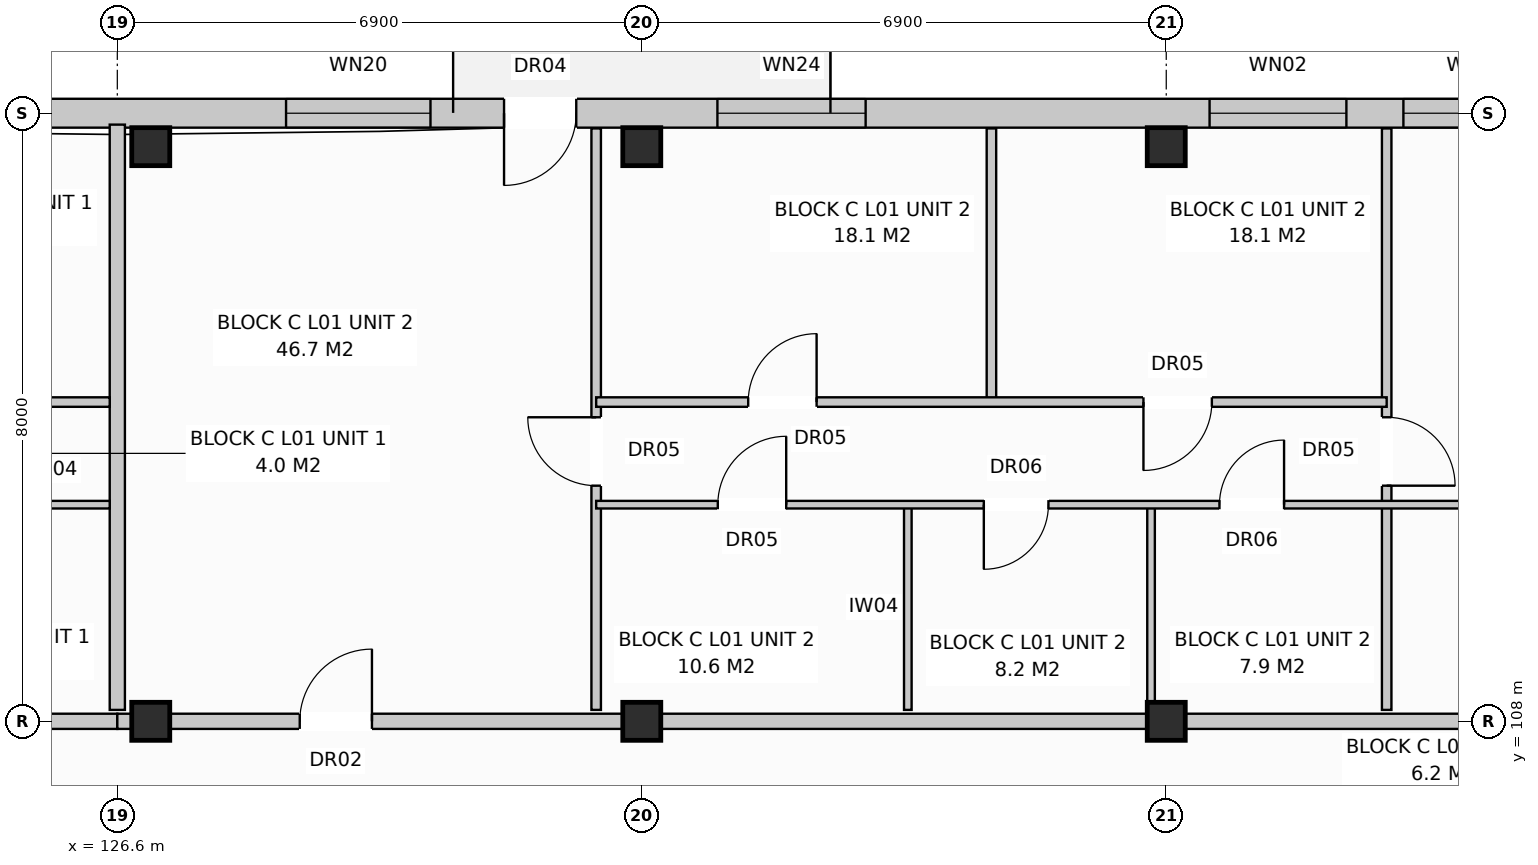
"""IFC4 building model, lengths in metres.
Left out: names, types, materials, properties, quantities, classifications, styles, units other than length and angle.
Written with IfcOpenShell. Run it as: python <this file> out.ifc"""

import sys

from ifc_helpers import new_model, si_unit, direction, frame, frame_2d, origin, origin_with_axes, origin_2d, place, context, subcontext, project, spatial, rectangle, extrude, element, fill, save


model = new_model("IFC4")
c1 = context("Model", 3, precision=1e-05, world=origin(), true_north=direction((0.0, 1.0)))
c2 = subcontext(c1, "Body", "Model", "MODEL_VIEW")
j1 = project(units=[si_unit("LENGTHUNIT", "METRE"), si_unit("PLANEANGLEUNIT", "RADIAN")], contexts=[c1])
p1 = place(None, origin())
s1 = spatial("IfcSite", under=j1, at=p1, CompositionType="ELEMENT")
p2 = place(p1, origin())
s2 = spatial("IfcBuilding", under=s1, at=p2, CompositionType="ELEMENT")
p3 = place(p2, frame((0.0, 0.0, 4.4)))
s3 = spatial("IfcBuildingStorey", under=s2, at=p3, CompositionType="ELEMENT", Elevation=4.4)
for number, where, z_axis, x_axis in (
    (1, (127.04, 108.0, 0.0), (0.0, 0.0, 1.0), (1.0, 0.0, 0.0)),
    (2, (127.04, 115.56, 0.0), (0.0, 0.0, 1.0), (1.0, 0.0, 0.0)),
    (3, (133.5, 108.0, 0.0), (0.0, 0.0, 1.0), (1.0, 0.0, 0.0)),
    (4, (133.5, 115.56, 0.0), (0.0, 0.0, 1.0), (1.0, 0.0, 0.0)),
    (5, (140.4, 108.0, 0.0), (0.0, 0.0, 1.0), (1.0, 0.0, 0.0)),
    (6, (140.4, 115.56, 0.0), (0.0, 0.0, 1.0), (1.0, 0.0, 0.0)),
):
    element("IfcColumn", number, at=place(p3, frame(where, z_axis=z_axis, x_axis=x_axis)), inside=s3, PredefinedType="COLUMN", context=c2, shape_type="SweptSolid", body=[
        extrude(rectangle(XDim=0.5, YDim=0.5, at=origin_2d()), origin(), (0.0, 0.0, 1.0), 3.6),
    ])
p4 = place(p3, frame((112.98, 116.0, 0.0), z_axis=(0.0, 0.0, 1.0), x_axis=(1.0, 0.0, 0.0)))
e7 = element("IfcWall", 7, at=p4, inside=s3, PredefinedType="STANDARD", context=c2, shape_type="SweptSolid", body=[
    extrude(rectangle(XDim=54.84, YDim=0.38, at=frame_2d((27.42, 0.0))), origin(), (0.0, 0.0, 1.0), 3.33),
])
p5 = place(p4, frame((7.39, 0.0, 0.0)))
e8 = element("IfcOpeningElement", 8, at=p5, cuts=e7, PredefinedType="OPENING", context=c2, shape_type="SweptSolid", body=[
    extrude(rectangle(XDim=0.95, YDim=2.1, at=frame_2d((0.475, 1.05))), frame((0.0, 0.202, 0.0), z_axis=(0.0, -1.0, 0.0), x_axis=(1.0, 0.0, 0.0)), (0.0, 0.0, 1.0), 0.404),
])
p6 = place(p4, frame((18.708, 0.0, 0.0)))
e9 = element("IfcOpeningElement", 9, at=p6, cuts=e7, PredefinedType="OPENING", context=c2, shape_type="SweptSolid", body=[
    extrude(rectangle(XDim=0.95, YDim=2.1, at=frame_2d((0.475, 1.05))), frame((0.0, 0.202, 0.0), z_axis=(0.0, -1.0, 0.0), x_axis=(1.0, 0.0, 0.0)), (0.0, 0.0, 1.0), 0.404),
])
p7 = place(p4, frame((32.708, 0.0, 0.0)))
e10 = element("IfcOpeningElement", 10, at=p7, cuts=e7, PredefinedType="OPENING", context=c2, shape_type="SweptSolid", body=[
    extrude(rectangle(XDim=0.95, YDim=2.1, at=frame_2d((0.475, 1.05))), frame((0.0, 0.202, 0.0), z_axis=(0.0, -1.0, 0.0), x_axis=(1.0, 0.0, 0.0)), (0.0, 0.0, 1.0), 0.404),
])
p8 = place(p4, frame((46.508, 0.0, 0.0)))
e11 = element("IfcOpeningElement", 11, at=p8, cuts=e7, PredefinedType="OPENING", context=c2, shape_type="SweptSolid", body=[
    extrude(rectangle(XDim=0.95, YDim=2.1, at=frame_2d((0.475, 1.05))), frame((0.0, 0.202, 0.0), z_axis=(0.0, -1.0, 0.0), x_axis=(1.0, 0.0, 0.0)), (0.0, 0.0, 1.0), 0.404),
])
p9 = place(p4, frame((1.515, 0.0, 0.8)))
e12 = element("IfcOpeningElement", 12, at=p9, cuts=e7, PredefinedType="OPENING", context=c2, shape_type="SweptSolid", body=[
    extrude(rectangle(XDim=1.95, YDim=1.65, at=frame_2d((0.975, 0.825))), frame((0.0, 0.202, 0.0), z_axis=(0.0, -1.0, 0.0), x_axis=(1.0, 0.0, 0.0)), (0.0, 0.0, 1.0), 0.404),
])
p10 = place(p4, frame((10.49, 0.0, 0.8)))
e13 = element("IfcOpeningElement", 13, at=p10, cuts=e7, PredefinedType="OPENING", context=c2, shape_type="SweptSolid", body=[
    extrude(rectangle(XDim=1.8, YDim=1.7, at=frame_2d((0.9, 0.85))), frame((0.0, 0.202, 0.0), z_axis=(0.0, -1.0, 0.0), x_axis=(1.0, 0.0, 0.0)), (0.0, 0.0, 1.0), 0.404),
])
p11 = place(p4, frame((15.84, 0.0, 0.8)))
e14 = element("IfcOpeningElement", 14, at=p11, cuts=e7, PredefinedType="OPENING", context=c2, shape_type="SweptSolid", body=[
    extrude(rectangle(XDim=1.9, YDim=1.85, at=frame_2d((0.95, 0.925))), frame((0.0, 0.202, 0.0), z_axis=(0.0, -1.0, 0.0), x_axis=(1.0, 0.0, 0.0)), (0.0, 0.0, 1.0), 0.404),
])
p12 = place(p4, frame((21.515, 0.0, 0.8)))
e15 = element("IfcOpeningElement", 15, at=p12, cuts=e7, PredefinedType="OPENING", context=c2, shape_type="SweptSolid", body=[
    extrude(rectangle(XDim=1.95, YDim=1.65, at=frame_2d((0.975, 0.825))), frame((0.0, 0.202, 0.0), z_axis=(0.0, -1.0, 0.0), x_axis=(1.0, 0.0, 0.0)), (0.0, 0.0, 1.0), 0.404),
])
p13 = place(p4, frame((27.99, 0.0, 0.8)))
e16 = element("IfcOpeningElement", 16, at=p13, cuts=e7, PredefinedType="OPENING", context=c2, shape_type="SweptSolid", body=[
    extrude(rectangle(XDim=1.8, YDim=1.7, at=frame_2d((0.9, 0.85))), frame((0.0, 0.202, 0.0), z_axis=(0.0, -1.0, 0.0), x_axis=(1.0, 0.0, 0.0)), (0.0, 0.0, 1.0), 0.404),
])
p14 = place(p4, frame((30.54, 0.0, 0.8)))
e17 = element("IfcOpeningElement", 17, at=p14, cuts=e7, PredefinedType="OPENING", context=c2, shape_type="SweptSolid", body=[
    extrude(rectangle(XDim=1.9, YDim=1.85, at=frame_2d((0.95, 0.925))), frame((0.0, 0.202, 0.0), z_axis=(0.0, -1.0, 0.0), x_axis=(1.0, 0.0, 0.0)), (0.0, 0.0, 1.0), 0.404),
])
p15 = place(p4, frame((35.515, 0.0, 0.8)))
e18 = element("IfcOpeningElement", 18, at=p15, cuts=e7, PredefinedType="OPENING", context=c2, shape_type="SweptSolid", body=[
    extrude(rectangle(XDim=1.95, YDim=1.65, at=frame_2d((0.975, 0.825))), frame((0.0, 0.202, 0.0), z_axis=(0.0, -1.0, 0.0), x_axis=(1.0, 0.0, 0.0)), (0.0, 0.0, 1.0), 0.404),
])
p16 = place(p4, frame((38.89, 0.0, 0.8)))
e19 = element("IfcOpeningElement", 19, at=p16, cuts=e7, PredefinedType="OPENING", context=c2, shape_type="SweptSolid", body=[
    extrude(rectangle(XDim=1.8, YDim=1.7, at=frame_2d((0.9, 0.85))), frame((0.0, 0.202, 0.0), z_axis=(0.0, -1.0, 0.0), x_axis=(1.0, 0.0, 0.0)), (0.0, 0.0, 1.0), 0.404),
])
p17 = place(p4, frame((44.34, 0.0, 0.8)))
e20 = element("IfcOpeningElement", 20, at=p17, cuts=e7, PredefinedType="OPENING", context=c2, shape_type="SweptSolid", body=[
    extrude(rectangle(XDim=1.9, YDim=1.85, at=frame_2d((0.95, 0.925))), frame((0.0, 0.202, 0.0), z_axis=(0.0, -1.0, 0.0), x_axis=(1.0, 0.0, 0.0)), (0.0, 0.0, 1.0), 0.404),
])
p18 = place(p4, frame((49.115, 0.0, 0.8)))
e21 = element("IfcOpeningElement", 21, at=p18, cuts=e7, PredefinedType="OPENING", context=c2, shape_type="SweptSolid", body=[
    extrude(rectangle(XDim=1.95, YDim=1.65, at=frame_2d((0.975, 0.825))), frame((0.0, 0.202, 0.0), z_axis=(0.0, -1.0, 0.0), x_axis=(1.0, 0.0, 0.0)), (0.0, 0.0, 1.0), 0.404),
])
p19 = place(p4, frame((52.405, 0.0, 0.8)))
e22 = element("IfcOpeningElement", 22, at=p19, cuts=e7, PredefinedType="OPENING", context=c2, shape_type="SweptSolid", body=[
    extrude(rectangle(XDim=1.8, YDim=1.7, at=frame_2d((0.9, 0.85))), frame((0.0, 0.202, 0.0), z_axis=(0.0, -1.0, 0.0), x_axis=(1.0, 0.0, 0.0)), (0.0, 0.0, 1.0), 0.404),
])
p20 = place(p3, frame((126.6, 108.15, 0.0), z_axis=(0.0, 0.0, 1.0), x_axis=(0.0, 1.0, 0.0)))
e23 = element("IfcWall", 23, at=p20, inside=s3, PredefinedType="PARTITIONING", context=c2, shape_type="SweptSolid", body=[
    extrude(rectangle(XDim=7.7, YDim=0.2, at=frame_2d((3.85, 0.0))), origin(), (0.0, 0.0, 1.0), 3.33),
])
p21 = place(p3, frame((112.8, 108.0, 0.0), z_axis=(0.0, 0.0, 1.0), x_axis=(1.0, 0.0, 0.0)))
e24 = element("IfcWall", 24, at=p21, inside=s3, PredefinedType="PARTITIONING", context=c2, shape_type="SweptSolid", body=[
    extrude(rectangle(XDim=13.8, YDim=0.2, at=frame_2d((6.9, 0.0))), origin(), (0.0, 0.0, 1.0), 2.77),
])
p22 = place(p21, frame((2.4, 0.0, 0.0)))
e25 = element("IfcOpeningElement", 25, at=p22, cuts=e24, PredefinedType="OPENING", context=c2, shape_type="SweptSolid", body=[
    extrude(rectangle(XDim=0.95, YDim=2.15, at=frame_2d((0.475, 1.075))), frame((0.0, 0.112, 0.0), z_axis=(0.0, -1.0, 0.0), x_axis=(1.0, 0.0, 0.0)), (0.0, 0.0, 1.0), 0.224),
])
p23 = place(p3, frame((118.0, 110.85, 0.0), z_axis=(0.0, 0.0, 1.0), x_axis=(1.0, 0.0, 0.0)))
e26 = element("IfcWall", 26, at=p23, inside=s3, PredefinedType="PARTITIONING", context=c2, shape_type="SweptSolid", body=[
    extrude(rectangle(XDim=8.5, YDim=0.1, at=frame_2d((4.25, 0.0))), origin(), (0.0, 0.0, 1.0), 3.33),
])
p24 = place(p23, frame((1.0, 0.0, 0.0)))
e27 = element("IfcOpeningElement", 27, at=p24, cuts=e26, PredefinedType="OPENING", context=c2, shape_type="SweptSolid", body=[
    extrude(rectangle(XDim=0.85, YDim=2.1, at=frame_2d((0.425, 1.05))), frame((0.0, 0.062, 0.0), z_axis=(0.0, -1.0, 0.0), x_axis=(1.0, 0.0, 0.0)), (0.0, 0.0, 1.0), 0.124),
])
p25 = place(p23, frame((3.4, 0.0, 0.0)))
e28 = element("IfcOpeningElement", 28, at=p25, cuts=e26, PredefinedType="OPENING", context=c2, shape_type="SweptSolid", body=[
    extrude(rectangle(XDim=0.85, YDim=2.05, at=frame_2d((0.425, 1.025))), frame((0.0, 0.062, 0.0), z_axis=(0.0, -1.0, 0.0), x_axis=(1.0, 0.0, 0.0)), (0.0, 0.0, 1.0), 0.124),
])
p26 = place(p23, frame((6.2, 0.0, 0.0)))
e29 = element("IfcOpeningElement", 29, at=p26, cuts=e26, PredefinedType="OPENING", context=c2, shape_type="SweptSolid", body=[
    extrude(rectangle(XDim=0.85, YDim=2.05, at=frame_2d((0.425, 1.025))), frame((0.0, 0.062, 0.0), z_axis=(0.0, -1.0, 0.0), x_axis=(1.0, 0.0, 0.0)), (0.0, 0.0, 1.0), 0.124),
])
p27 = place(p3, frame((118.0, 112.2, 0.0), z_axis=(0.0, 0.0, 1.0), x_axis=(1.0, 0.0, 0.0)))
e30 = element("IfcWall", 30, at=p27, inside=s3, PredefinedType="PARTITIONING", context=c2, shape_type="SweptSolid", body=[
    extrude(rectangle(XDim=8.5, YDim=0.125, at=frame_2d((4.25, 0.0))), origin(), (0.0, 0.0, 1.0), 3.33),
])
p28 = place(p27, frame((1.5, 0.0, 0.0)))
e31 = element("IfcOpeningElement", 31, at=p28, cuts=e30, PredefinedType="OPENING", context=c2, shape_type="SweptSolid", body=[
    extrude(rectangle(XDim=0.9, YDim=2.1, at=frame_2d((0.45, 1.05))), frame((0.0, 0.074, 0.0), z_axis=(0.0, -1.0, 0.0), x_axis=(1.0, 0.0, 0.0)), (0.0, 0.0, 1.0), 0.149),
])
p29 = place(p27, frame((5.6, 0.0, 0.0)))
e32 = element("IfcOpeningElement", 32, at=p29, cuts=e30, PredefinedType="OPENING", context=c2, shape_type="SweptSolid", body=[
    extrude(rectangle(XDim=0.9, YDim=2.1, at=frame_2d((0.45, 1.05))), frame((0.0, 0.074, 0.0), z_axis=(0.0, -1.0, 0.0), x_axis=(1.0, 0.0, 0.0)), (0.0, 0.0, 1.0), 0.149),
])
p30 = place(p3, frame((126.6, 108.0, 0.0), z_axis=(0.0, 0.0, 1.0), x_axis=(1.0, 0.0, 0.0)))
e33 = element("IfcWall", 33, at=p30, inside=s3, PredefinedType="PARTITIONING", context=c2, shape_type="SweptSolid", body=[
    extrude(rectangle(XDim=20.7, YDim=0.2, at=frame_2d((10.35, 0.0))), origin(), (0.0, 0.0, 1.0), 2.77),
])
p31 = place(p30, frame((2.4, 0.0, 0.0)))
e34 = element("IfcOpeningElement", 34, at=p31, cuts=e33, PredefinedType="OPENING", context=c2, shape_type="SweptSolid", body=[
    extrude(rectangle(XDim=0.95, YDim=2.15, at=frame_2d((0.475, 1.075))), frame((0.0, 0.112, 0.0), z_axis=(0.0, -1.0, 0.0), x_axis=(1.0, 0.0, 0.0)), (0.0, 0.0, 1.0), 0.224),
])
p32 = place(p3, frame((132.9, 108.15, 0.0), z_axis=(0.0, 0.0, 1.0), x_axis=(0.0, 1.0, 0.0)))
e35 = element("IfcWall", 35, at=p32, inside=s3, PredefinedType="PARTITIONING", context=c2, shape_type="SweptSolid", body=[
    extrude(rectangle(XDim=7.65, YDim=0.125, at=frame_2d((3.825, 0.0))), origin(), (0.0, 0.0, 1.0), 3.33),
])
p33 = place(p32, frame((2.95, 0.0, 0.0)))
e36 = element("IfcOpeningElement", 36, at=p33, cuts=e35, PredefinedType="OPENING", context=c2, shape_type="SweptSolid", body=[
    extrude(rectangle(XDim=0.9, YDim=2.1, at=frame_2d((0.45, 1.05))), frame((0.0, 0.074, 0.0), z_axis=(0.0, -1.0, 0.0), x_axis=(1.0, 0.0, 0.0)), (0.0, 0.0, 1.0), 0.149),
])
for number, where, z_axis, x_axis in (
    (37, (137.0, 108.15, 0.0), (0.0, 0.0, 1.0), (0.0, 1.0, 0.0)),
    (38, (140.2, 108.15, 0.0), (0.0, 0.0, 1.0), (0.0, 1.0, 0.0)),
):
    element("IfcWall", number, at=place(p3, frame(where, z_axis=z_axis, x_axis=x_axis)), inside=s3, PredefinedType="PARTITIONING", context=c2, shape_type="SweptSolid", body=[
        extrude(rectangle(XDim=2.7, YDim=0.1, at=frame_2d((1.35, 0.0))), origin(), (0.0, 0.0, 1.0), 3.33),
    ])
p34 = place(p3, frame((138.1, 112.2, 0.0), z_axis=(0.0, 0.0, 1.0), x_axis=(0.0, 1.0, 0.0)))
e39 = element("IfcWall", 39, at=p34, inside=s3, PredefinedType="PARTITIONING", context=c2, shape_type="SweptSolid", body=[
    extrude(rectangle(XDim=3.6, YDim=0.125, at=frame_2d((1.8, 0.0))), origin(), (0.0, 0.0, 1.0), 3.33),
])
p35 = place(p3, frame((143.3, 108.15, 0.0), z_axis=(0.0, 0.0, 1.0), x_axis=(0.0, 1.0, 0.0)))
e40 = element("IfcWall", 40, at=p35, inside=s3, PredefinedType="PARTITIONING", context=c2, shape_type="SweptSolid", body=[
    extrude(rectangle(XDim=7.65, YDim=0.125, at=frame_2d((3.825, 0.0))), origin(), (0.0, 0.0, 1.0), 2.99),
])
p36 = place(p35, frame((2.95, 0.0, 0.0)))
e41 = element("IfcOpeningElement", 41, at=p36, cuts=e40, PredefinedType="OPENING", context=c2, shape_type="SweptSolid", body=[
    extrude(rectangle(XDim=0.9, YDim=2.1, at=frame_2d((0.45, 1.05))), frame((0.0, 0.074, 0.0), z_axis=(0.0, -1.0, 0.0), x_axis=(1.0, 0.0, 0.0)), (0.0, 0.0, 1.0), 0.149),
])
p37 = place(p3, frame((132.9, 110.85, 0.0), z_axis=(0.0, 0.0, 1.0), x_axis=(1.0, 0.0, 0.0)))
e42 = element("IfcWall", 42, at=p37, inside=s3, PredefinedType="PARTITIONING", context=c2, shape_type="SweptSolid", body=[
    extrude(rectangle(XDim=14.3, YDim=0.1, at=frame_2d((7.15, 0.0))), origin(), (0.0, 0.0, 1.0), 3.33),
])
p38 = place(p37, frame((1.6, 0.0, 0.0)))
e43 = element("IfcOpeningElement", 43, at=p38, cuts=e42, PredefinedType="OPENING", context=c2, shape_type="SweptSolid", body=[
    extrude(rectangle(XDim=0.9, YDim=2.1, at=frame_2d((0.45, 1.05))), frame((0.0, 0.062, 0.0), z_axis=(0.0, -1.0, 0.0), x_axis=(1.0, 0.0, 0.0)), (0.0, 0.0, 1.0), 0.124),
])
p39 = place(p37, frame((5.1, 0.0, 0.0)))
e44 = element("IfcOpeningElement", 44, at=p39, cuts=e42, PredefinedType="OPENING", context=c2, shape_type="SweptSolid", body=[
    extrude(rectangle(XDim=0.85, YDim=2.05, at=frame_2d((0.425, 1.025))), frame((0.0, 0.062, 0.0), z_axis=(0.0, -1.0, 0.0), x_axis=(1.0, 0.0, 0.0)), (0.0, 0.0, 1.0), 0.124),
])
p40 = place(p37, frame((8.2, 0.0, 0.0)))
e45 = element("IfcOpeningElement", 45, at=p40, cuts=e42, PredefinedType="OPENING", context=c2, shape_type="SweptSolid", body=[
    extrude(rectangle(XDim=0.85, YDim=2.05, at=frame_2d((0.425, 1.025))), frame((0.0, 0.062, 0.0), z_axis=(0.0, -1.0, 0.0), x_axis=(1.0, 0.0, 0.0)), (0.0, 0.0, 1.0), 0.124),
])
p41 = place(p37, frame((11.6, 0.0, 0.0)))
e46 = element("IfcOpeningElement", 46, at=p41, cuts=e42, PredefinedType="OPENING", context=c2, shape_type="SweptSolid", body=[
    extrude(rectangle(XDim=0.85, YDim=2.05, at=frame_2d((0.425, 1.025))), frame((0.0, 0.062, 0.0), z_axis=(0.0, -1.0, 0.0), x_axis=(1.0, 0.0, 0.0)), (0.0, 0.0, 1.0), 0.124),
])
p42 = place(p3, frame((132.9, 112.2, 0.0), z_axis=(0.0, 0.0, 1.0), x_axis=(1.0, 0.0, 0.0)))
e47 = element("IfcWall", 47, at=p42, inside=s3, PredefinedType="PARTITIONING", context=c2, shape_type="SweptSolid", body=[
    extrude(rectangle(XDim=10.4, YDim=0.125, at=frame_2d((5.2, 0.0))), origin(), (0.0, 0.0, 1.0), 3.33),
])
p43 = place(p42, frame((2.0, 0.0, 0.0)))
e48 = element("IfcOpeningElement", 48, at=p43, cuts=e47, PredefinedType="OPENING", context=c2, shape_type="SweptSolid", body=[
    extrude(rectangle(XDim=0.9, YDim=2.1, at=frame_2d((0.45, 1.05))), frame((0.0, 0.074, 0.0), z_axis=(0.0, -1.0, 0.0), x_axis=(1.0, 0.0, 0.0)), (0.0, 0.0, 1.0), 0.149),
])
p44 = place(p42, frame((7.2, 0.0, 0.0)))
e49 = element("IfcOpeningElement", 49, at=p44, cuts=e47, PredefinedType="OPENING", context=c2, shape_type="SweptSolid", body=[
    extrude(rectangle(XDim=0.9, YDim=2.1, at=frame_2d((0.45, 1.05))), frame((0.0, 0.074, 0.0), z_axis=(0.0, -1.0, 0.0), x_axis=(1.0, 0.0, 0.0)), (0.0, 0.0, 1.0), 0.149),
])
p45 = place(p6, frame((0.95, 0.0, 0.0), z_axis=(0.0, 0.0, 1.0), x_axis=(-1.0, 0.0, 0.0)))
e50 = element("IfcDoor", 50, at=p45, inside=s3, OperationType="SINGLE_SWING_LEFT", PredefinedType="DOOR", context=c2, shape_type="SweptSolid", body=[
    extrude(rectangle(XDim=0.95, YDim=2.1, at=frame_2d((0.475, 1.05))), frame((0.0, 0.025, 0.0), z_axis=(0.0, -1.0, 0.0), x_axis=(1.0, 0.0, 0.0)), (0.0, 0.0, 1.0), 0.05),
])
fill(e9, e50)
p46 = place(p11, origin_with_axes())
e51 = element("IfcWindow", 51, at=p46, inside=s3, PartitioningType="SINGLE_PANEL", PredefinedType="WINDOW", context=c2, shape_type="SweptSolid", body=[
    extrude(rectangle(XDim=1.9, YDim=1.85, at=frame_2d((0.95, 0.925))), frame((0.0, 0.03, 0.0), z_axis=(0.0, -1.0, 0.0), x_axis=(1.0, 0.0, 0.0)), (0.0, 0.0, 1.0), 0.06),
])
fill(e14, e51)
p47 = place(p12, origin_with_axes())
e52 = element("IfcWindow", 52, at=p47, inside=s3, PartitioningType="SINGLE_PANEL", PredefinedType="WINDOW", context=c2, shape_type="SweptSolid", body=[
    extrude(rectangle(XDim=1.95, YDim=1.65, at=frame_2d((0.975, 0.825))), frame((0.0, 0.03, 0.0), z_axis=(0.0, -1.0, 0.0), x_axis=(1.0, 0.0, 0.0)), (0.0, 0.0, 1.0), 0.06),
])
fill(e15, e52)
p48 = place(p13, origin_with_axes())
e53 = element("IfcWindow", 53, at=p48, inside=s3, PartitioningType="SINGLE_PANEL", PredefinedType="WINDOW", context=c2, shape_type="SweptSolid", body=[
    extrude(rectangle(XDim=1.8, YDim=1.7, at=frame_2d((0.9, 0.85))), frame((0.0, 0.03, 0.0), z_axis=(0.0, -1.0, 0.0), x_axis=(1.0, 0.0, 0.0)), (0.0, 0.0, 1.0), 0.06),
])
fill(e16, e53)
p49 = place(p14, origin_with_axes())
e54 = element("IfcWindow", 54, at=p49, inside=s3, PartitioningType="SINGLE_PANEL", PredefinedType="WINDOW", context=c2, shape_type="SweptSolid", body=[
    extrude(rectangle(XDim=1.9, YDim=1.85, at=frame_2d((0.95, 0.925))), frame((0.0, 0.03, 0.0), z_axis=(0.0, -1.0, 0.0), x_axis=(1.0, 0.0, 0.0)), (0.0, 0.0, 1.0), 0.06),
])
fill(e17, e54)
p50 = place(p31, origin_with_axes())
e55 = element("IfcDoor", 55, at=p50, inside=s3, OperationType="SINGLE_SWING_RIGHT", PredefinedType="DOOR", context=c2, shape_type="SweptSolid", body=[
    extrude(rectangle(XDim=0.95, YDim=2.15, at=frame_2d((0.475, 1.075))), frame((0.0, 0.025, 0.0), z_axis=(0.0, -1.0, 0.0), x_axis=(1.0, 0.0, 0.0)), (0.0, 0.0, 1.0), 0.05),
])
fill(e34, e55)
p51 = place(p33, origin_with_axes())
e56 = element("IfcDoor", 56, at=p51, inside=s3, OperationType="SINGLE_SWING_RIGHT", PredefinedType="DOOR", context=c2, shape_type="SweptSolid", body=[
    extrude(rectangle(XDim=0.9, YDim=2.1, at=frame_2d((0.45, 1.05))), frame((0.0, 0.025, 0.0), z_axis=(0.0, -1.0, 0.0), x_axis=(1.0, 0.0, 0.0)), (0.0, 0.0, 1.0), 0.05),
])
fill(e36, e56)
p52 = place(p36, frame((0.9, 0.0, 0.0), z_axis=(0.0, 0.0, 1.0), x_axis=(-1.0, 0.0, 0.0)))
e57 = element("IfcDoor", 57, at=p52, inside=s3, OperationType="SINGLE_SWING_LEFT", PredefinedType="DOOR", context=c2, shape_type="SweptSolid", body=[
    extrude(rectangle(XDim=0.9, YDim=2.1, at=frame_2d((0.45, 1.05))), frame((0.0, 0.025, 0.0), z_axis=(0.0, -1.0, 0.0), x_axis=(1.0, 0.0, 0.0)), (0.0, 0.0, 1.0), 0.05),
])
fill(e41, e57)
p53 = place(p38, origin_with_axes())
e58 = element("IfcDoor", 58, at=p53, inside=s3, OperationType="SINGLE_SWING_RIGHT", PredefinedType="DOOR", context=c2, shape_type="SweptSolid", body=[
    extrude(rectangle(XDim=0.9, YDim=2.1, at=frame_2d((0.45, 1.05))), frame((0.0, 0.025, 0.0), z_axis=(0.0, -1.0, 0.0), x_axis=(1.0, 0.0, 0.0)), (0.0, 0.0, 1.0), 0.05),
])
fill(e43, e58)
p54 = place(p39, frame((0.85, 0.0, 0.0), z_axis=(0.0, 0.0, 1.0), x_axis=(-1.0, 0.0, 0.0)))
e59 = element("IfcDoor", 59, at=p54, inside=s3, OperationType="SINGLE_SWING_LEFT", PredefinedType="DOOR", context=c2, shape_type="SweptSolid", body=[
    extrude(rectangle(XDim=0.85, YDim=2.05, at=frame_2d((0.425, 1.025))), frame((0.0, 0.025, 0.0), z_axis=(0.0, -1.0, 0.0), x_axis=(1.0, 0.0, 0.0)), (0.0, 0.0, 1.0), 0.05),
])
fill(e44, e59)
p55 = place(p40, origin_with_axes())
e60 = element("IfcDoor", 60, at=p55, inside=s3, OperationType="SINGLE_SWING_RIGHT", PredefinedType="DOOR", context=c2, shape_type="SweptSolid", body=[
    extrude(rectangle(XDim=0.85, YDim=2.05, at=frame_2d((0.425, 1.025))), frame((0.0, 0.025, 0.0), z_axis=(0.0, -1.0, 0.0), x_axis=(1.0, 0.0, 0.0)), (0.0, 0.0, 1.0), 0.05),
])
fill(e45, e60)
p56 = place(p43, origin_with_axes())
e61 = element("IfcDoor", 61, at=p56, inside=s3, OperationType="SINGLE_SWING_RIGHT", PredefinedType="DOOR", context=c2, shape_type="SweptSolid", body=[
    extrude(rectangle(XDim=0.9, YDim=2.1, at=frame_2d((0.45, 1.05))), frame((0.0, 0.025, 0.0), z_axis=(0.0, -1.0, 0.0), x_axis=(1.0, 0.0, 0.0)), (0.0, 0.0, 1.0), 0.05),
])
fill(e48, e61)
p57 = place(p44, frame((0.9, 0.0, 0.0), z_axis=(0.0, 0.0, 1.0), x_axis=(-1.0, 0.0, 0.0)))
e62 = element("IfcDoor", 62, at=p57, inside=s3, OperationType="SINGLE_SWING_LEFT", PredefinedType="DOOR", context=c2, shape_type="SweptSolid", body=[
    extrude(rectangle(XDim=0.9, YDim=2.1, at=frame_2d((0.45, 1.05))), frame((0.0, 0.025, 0.0), z_axis=(0.0, -1.0, 0.0), x_axis=(1.0, 0.0, 0.0)), (0.0, 0.0, 1.0), 0.05),
])
fill(e49, e62)
save(model, sys.argv[1])
